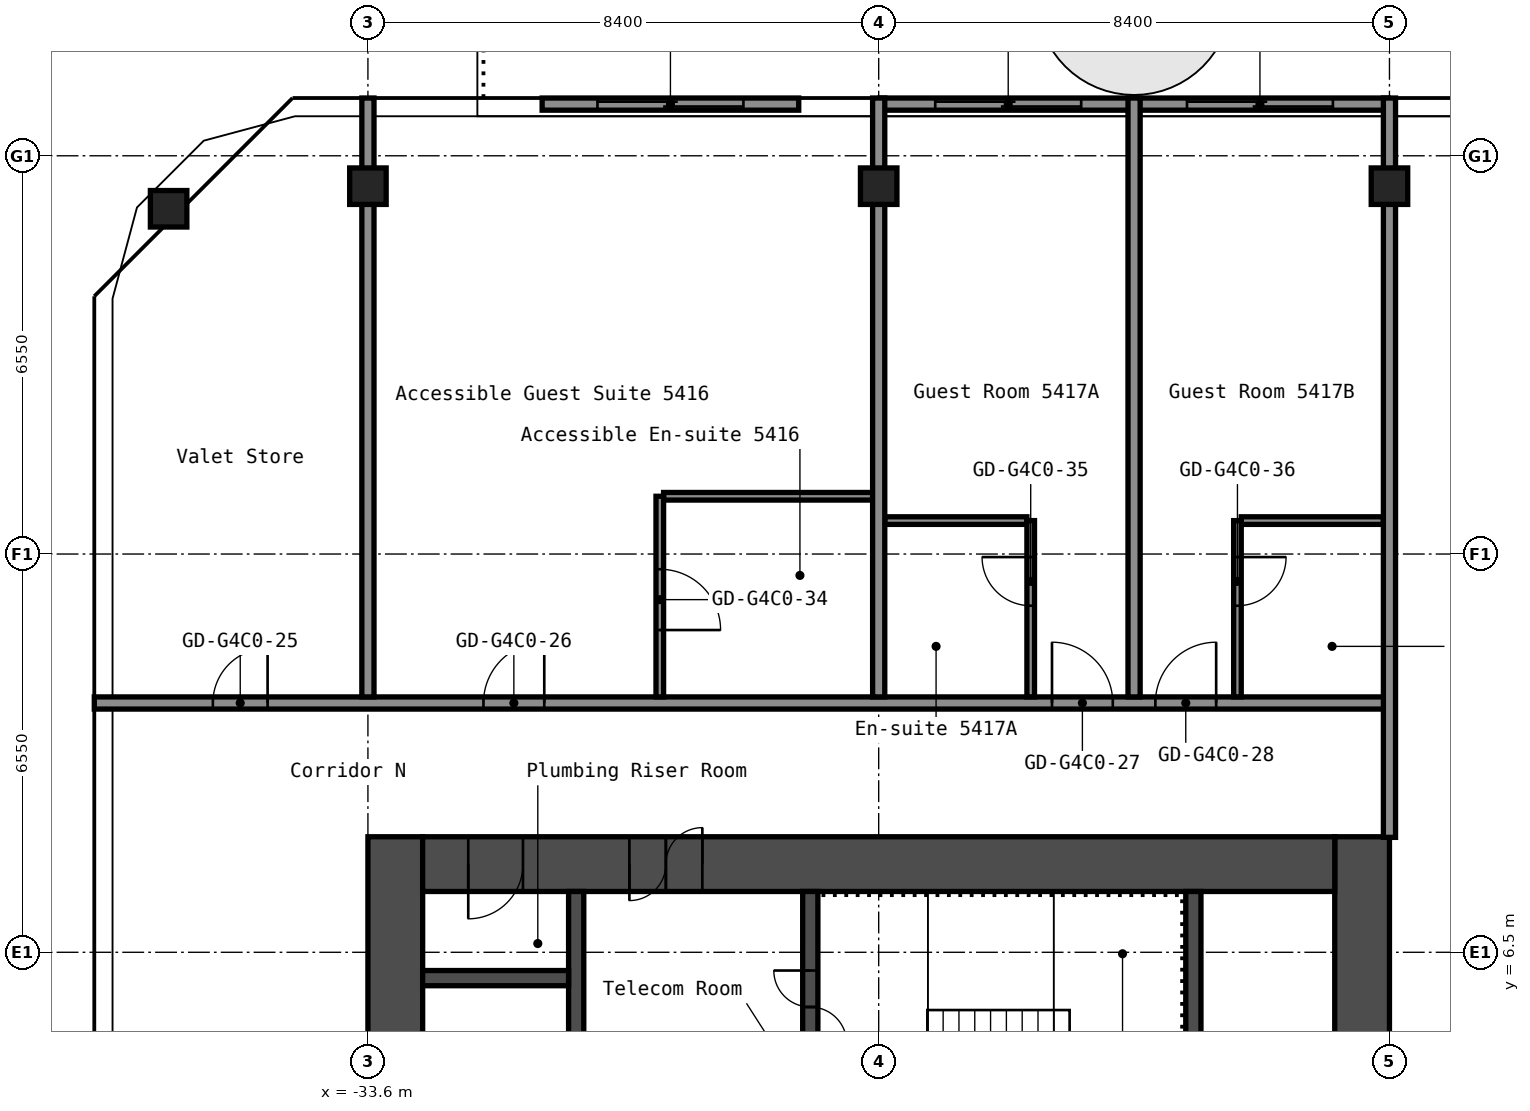
"""IFC4 building model, lengths in metres.
Left out: names, types, materials, properties, quantities, classifications, styles, units other than length and angle.
Written with IfcOpenShell. Run it as: python <this file> out.ifc"""

import sys

from ifc_helpers import new_model, si_unit, direction, frame, frame_2d, origin, origin_2d, place, context, subcontext, project, spatial, rectangle, hollow_rectangle, extrude, element, fill, save


model = new_model("IFC4")
c1 = context("Model", 3, precision=1e-05, world=origin(), true_north=direction((0.0, 1.0)))
c2 = subcontext(c1, "Body", "Model", "MODEL_VIEW")
j1 = project(units=[si_unit("LENGTHUNIT", "METRE"), si_unit("PLANEANGLEUNIT", "RADIAN")], contexts=[c1])
p1 = place(None, origin())
s1 = spatial("IfcSite", under=j1, at=p1, CompositionType="ELEMENT")
p2 = place(p1, origin())
s2 = spatial("IfcBuilding", under=s1, at=p2, CompositionType="ELEMENT")
p3 = place(p2, frame((0.0, 0.0, 193.0)))
s3 = spatial("IfcBuildingStorey", under=s2, at=p3, CompositionType="ELEMENT", Elevation=193.0)
for number, where, z_axis, x_axis in (
    (1, (-36.878, 18.729, 0.0), (0.0, 0.0, 1.0), (1.0, 0.0, 0.0)),
    (2, (-33.6, 19.1, 0.0), (0.0, 0.0, 1.0), (1.0, 0.0, 0.0)),
    (3, (-25.2, 19.1, 0.0), (0.0, 0.0, 1.0), (1.0, 0.0, 0.0)),
    (4, (-16.8, 19.1, 0.0), (0.0, 0.0, 1.0), (1.0, 0.0, 0.0)),
):
    element("IfcColumn", number, at=place(p3, frame(where, z_axis=z_axis, x_axis=x_axis)), inside=s3, PredefinedType="COLUMN", context=c2, shape_type="SweptSolid", body=[
        extrude(hollow_rectangle(XDim=0.6, YDim=0.6, WallThickness=0.025, InnerFilletRadius=0.038, OuterFilletRadius=0.062, at=origin_2d()), origin(), (0.0, 0.0, 1.0), 2.75),
    ])
p4 = place(p3, frame((-17.25, -8.4, 0.0), z_axis=(0.0, 0.0, 1.0), x_axis=(0.0, 1.0, 0.0)))
e5 = element("IfcWall", 5, at=p4, inside=s3, PredefinedType="SHEAR", context=c2, shape_type="SweptSolid", body=[
    extrude(rectangle(XDim=16.8, YDim=0.9, at=frame_2d((8.4, 0.0))), origin(), (0.0, 0.0, 1.0), 2.75),
])
p5 = place(p4, frame((10.1, 0.0, 0.0)))
e6 = element("IfcOpeningElement", 6, at=p5, cuts=e5, PredefinedType="OPENING", context=c2, shape_type="SweptSolid", body=[
    extrude(rectangle(XDim=1.6, YDim=2.1, at=frame_2d((0.8, 1.05))), frame((0.0, 0.46, 0.0), z_axis=(0.0, -1.0, 0.0), x_axis=(1.0, 0.0, 0.0)), (0.0, 0.0, 1.0), 0.92),
])
p6 = place(p3, frame((-33.15, -8.4, 0.0), z_axis=(0.0, 0.0, 1.0), x_axis=(0.0, 1.0, 0.0)))
e7 = element("IfcWall", 7, at=p6, inside=s3, PredefinedType="SHEAR", context=c2, shape_type="SweptSolid", body=[
    extrude(rectangle(XDim=16.8, YDim=0.9, at=frame_2d((8.4, 0.0))), origin(), (0.0, 0.0, 1.0), 2.75),
])
p7 = place(p3, frame((-32.7, 7.95, 0.0), z_axis=(0.0, 0.0, 1.0), x_axis=(1.0, 0.0, 0.0)))
e8 = element("IfcWall", 8, at=p7, inside=s3, PredefinedType="SHEAR", context=c2, shape_type="SweptSolid", body=[
    extrude(rectangle(XDim=15.0, YDim=0.9, at=frame_2d((7.5, 0.0))), origin(), (0.0, 0.0, 1.0), 2.75),
])
p8 = place(p7, frame((3.4, 0.0, 0.0)))
e9 = element("IfcOpeningElement", 9, at=p8, cuts=e8, PredefinedType="OPENING", context=c2, shape_type="SweptSolid", body=[
    extrude(rectangle(XDim=1.2, YDim=2.1, at=frame_2d((0.6, 1.05))), frame((0.0, 0.46, 0.0), z_axis=(0.0, -1.0, 0.0), x_axis=(1.0, 0.0, 0.0)), (0.0, 0.0, 1.0), 0.92),
])
p9 = place(p7, frame((0.75, 0.0, 0.0)))
e10 = element("IfcOpeningElement", 10, at=p9, cuts=e8, PredefinedType="OPENING", context=c2, shape_type="SweptSolid", body=[
    extrude(rectangle(XDim=0.9, YDim=2.1, at=frame_2d((0.45, 1.05))), frame((0.0, 0.46, 0.0), z_axis=(0.0, -1.0, 0.0), x_axis=(1.0, 0.0, 0.0)), (0.0, 0.0, 1.0), 0.92),
])
p10 = place(p3, frame((-20.025, 1.2, 0.0), z_axis=(0.0, 0.0, 1.0), x_axis=(0.0, 1.0, 0.0)))
e11 = element("IfcWall", 11, at=p10, inside=s3, PredefinedType="SHEAR", context=c2, shape_type="SweptSolid", body=[
    extrude(rectangle(XDim=6.3, YDim=0.25, at=frame_2d((3.15, 0.0))), origin(), (0.0, 0.0, 1.0), 2.75),
])
p11 = place(p3, frame((-26.325, 3.75, 0.0), z_axis=(0.0, 0.0, 1.0), x_axis=(0.0, 1.0, 0.0)))
e12 = element("IfcWall", 12, at=p11, inside=s3, PredefinedType="SHEAR", context=c2, shape_type="SweptSolid", body=[
    extrude(rectangle(XDim=3.75, YDim=0.25, at=frame_2d((1.875, 0.0))), origin(), (0.0, 0.0, 1.0), 2.75),
])
p12 = place(p11, frame((1.25, 0.0, 0.0)))
e13 = element("IfcOpeningElement", 13, at=p12, cuts=e12, PredefinedType="OPENING", context=c2, shape_type="SweptSolid", body=[
    extrude(rectangle(XDim=1.2, YDim=2.1, at=frame_2d((0.6, 1.05))), frame((0.0, 0.135, 0.0), z_axis=(0.0, -1.0, 0.0), x_axis=(1.0, 0.0, 0.0)), (0.0, 0.0, 1.0), 0.27),
])
p13 = place(p3, frame((-30.175, 1.45, 0.0), z_axis=(0.0, 0.0, 1.0), x_axis=(0.0, 1.0, 0.0)))
e14 = element("IfcWall", 14, at=p13, inside=s3, PredefinedType="SHEAR", context=c2, shape_type="SweptSolid", body=[
    extrude(rectangle(XDim=6.05, YDim=0.25, at=frame_2d((3.025, 0.0))), origin(), (0.0, 0.0, 1.0), 2.75),
])
p14 = place(p13, frame((2.625, 0.0, 0.0)))
e15 = element("IfcOpeningElement", 15, at=p14, cuts=e14, PredefinedType="OPENING", context=c2, shape_type="SweptSolid", body=[
    extrude(rectangle(XDim=1.1, YDim=2.1, at=frame_2d((0.55, 1.05))), frame((0.0, 0.135, 0.0), z_axis=(0.0, -1.0, 0.0), x_axis=(1.0, 0.0, 0.0)), (0.0, 0.0, 1.0), 0.27),
])
p15 = place(p3, frame((-32.7, 6.075, 0.0), z_axis=(0.0, 0.0, 1.0), x_axis=(1.0, 0.0, 0.0)))
e16 = element("IfcWall", 16, at=p15, inside=s3, PredefinedType="SHEAR", context=c2, shape_type="SweptSolid", body=[
    extrude(rectangle(XDim=2.4, YDim=0.25, at=frame_2d((1.2, 0.0))), origin(), (0.0, 0.0, 1.0), 2.75),
])
p16 = place(p3, frame((-38.1, 10.6, 0.0), z_axis=(0.0, 0.0, 1.0), x_axis=(1.0, 0.0, 0.0)))
e17 = element("IfcWall", 17, at=p16, inside=s3, PredefinedType="PARTITIONING", context=c2, shape_type="SweptSolid", body=[
    extrude(rectangle(XDim=21.3, YDim=0.2, at=frame_2d((10.65, 0.0))), origin(), (0.0, 0.0, 1.0), 2.75),
])
p17 = place(p16, frame((1.95, 0.0, 0.0)))
e18 = element("IfcOpeningElement", 18, at=p17, cuts=e17, PredefinedType="OPENING", context=c2, shape_type="SweptSolid", body=[
    extrude(rectangle(XDim=0.9, YDim=2.1, at=frame_2d((0.45, 1.05))), frame((0.0, 0.11, 0.0), z_axis=(0.0, -1.0, 0.0), x_axis=(1.0, 0.0, 0.0)), (0.0, 0.0, 1.0), 0.22),
])
p18 = place(p16, frame((6.4, 0.0, 0.0)))
e19 = element("IfcOpeningElement", 19, at=p18, cuts=e17, PredefinedType="OPENING", context=c2, shape_type="SweptSolid", body=[
    extrude(rectangle(XDim=1.0, YDim=2.1, at=frame_2d((0.5, 1.05))), frame((0.0, 0.11, 0.0), z_axis=(0.0, -1.0, 0.0), x_axis=(1.0, 0.0, 0.0)), (0.0, 0.0, 1.0), 0.22),
])
p19 = place(p16, frame((15.75, 0.0, 0.0)))
e20 = element("IfcOpeningElement", 20, at=p19, cuts=e17, PredefinedType="OPENING", context=c2, shape_type="SweptSolid", body=[
    extrude(rectangle(XDim=1.0, YDim=2.1, at=frame_2d((0.5, 1.05))), frame((0.0, 0.11, 0.0), z_axis=(0.0, -1.0, 0.0), x_axis=(1.0, 0.0, 0.0)), (0.0, 0.0, 1.0), 0.22),
])
p20 = place(p16, frame((17.45, 0.0, 0.0)))
e21 = element("IfcOpeningElement", 21, at=p20, cuts=e17, PredefinedType="OPENING", context=c2, shape_type="SweptSolid", body=[
    extrude(rectangle(XDim=1.0, YDim=2.1, at=frame_2d((0.5, 1.05))), frame((0.0, 0.11, 0.0), z_axis=(0.0, -1.0, 0.0), x_axis=(1.0, 0.0, 0.0)), (0.0, 0.0, 1.0), 0.22),
])
for number, where, z_axis, x_axis in (
    (22, (-25.1, 13.6, 0.0), (0.0, 0.0, 1.0), (1.0, 0.0, 0.0)),
    (23, (-19.238, 13.6, 0.0), (0.0, 0.0, 1.0), (1.0, 0.0, 0.0)),
):
    element("IfcWall", number, at=place(p3, frame(where, z_axis=z_axis, x_axis=x_axis)), inside=s3, PredefinedType="PARTITIONING", context=c2, shape_type="SweptSolid", body=[
        extrude(rectangle(XDim=2.338, YDim=0.125, at=frame_2d((1.169, 0.0))), origin(), (0.0, 0.0, 1.0), 2.75),
    ])
p21 = place(p3, frame((-28.738, 14.0, 0.0), z_axis=(0.0, 0.0, 1.0), x_axis=(1.0, 0.0, 0.0)))
e24 = element("IfcWall", 24, at=p21, inside=s3, PredefinedType="PARTITIONING", context=c2, shape_type="SweptSolid", body=[
    extrude(rectangle(XDim=3.438, YDim=0.125, at=frame_2d((1.719, 0.0))), origin(), (0.0, 0.0, 1.0), 2.75),
])
p22 = place(p3, frame((-33.6, 10.7, 0.0), z_axis=(0.0, 0.0, 1.0), x_axis=(0.0, 1.0, 0.0)))
e25 = element("IfcWall", 25, at=p22, inside=s3, PredefinedType="PARTITIONING", context=c2, shape_type="SweptSolid", body=[
    extrude(rectangle(XDim=9.85, YDim=0.2, at=frame_2d((4.925, 0.0))), origin(), (0.0, 0.0, 1.0), 2.75),
])
p23 = place(p3, frame((-28.8, 10.7, 0.0), z_axis=(0.0, 0.0, 1.0), x_axis=(0.0, 1.0, 0.0)))
e26 = element("IfcWall", 26, at=p23, inside=s3, PredefinedType="PARTITIONING", context=c2, shape_type="SweptSolid", body=[
    extrude(rectangle(XDim=3.3, YDim=0.125, at=frame_2d((1.65, 0.0))), origin(), (0.0, 0.0, 1.0), 2.75),
])
p24 = place(p23, frame((1.1, 0.0, 0.0)))
e27 = element("IfcOpeningElement", 27, at=p24, cuts=e26, PredefinedType="OPENING", context=c2, shape_type="SweptSolid", body=[
    extrude(rectangle(XDim=1.0, YDim=2.1, at=frame_2d((0.5, 1.05))), frame((0.0, 0.073, 0.0), z_axis=(0.0, -1.0, 0.0), x_axis=(1.0, 0.0, 0.0)), (0.0, 0.0, 1.0), 0.145),
])
p25 = place(p3, frame((-25.2, 10.7, 0.0), z_axis=(0.0, 0.0, 1.0), x_axis=(0.0, 1.0, 0.0)))
e28 = element("IfcWall", 28, at=p25, inside=s3, PredefinedType="PARTITIONING", context=c2, shape_type="SweptSolid", body=[
    extrude(rectangle(XDim=9.85, YDim=0.2, at=frame_2d((4.925, 0.0))), origin(), (0.0, 0.0, 1.0), 2.75),
])
p26 = place(p3, frame((-22.7, 10.7, 0.0), z_axis=(0.0, 0.0, 1.0), x_axis=(0.0, 1.0, 0.0)))
e29 = element("IfcWall", 29, at=p26, inside=s3, PredefinedType="PARTITIONING", context=c2, shape_type="SweptSolid", body=[
    extrude(rectangle(XDim=2.9, YDim=0.125, at=frame_2d((1.45, 0.0))), origin(), (0.0, 0.0, 1.0), 2.75),
])
p27 = place(p26, frame((1.5, 0.0, 0.0)))
e30 = element("IfcOpeningElement", 30, at=p27, cuts=e29, PredefinedType="OPENING", context=c2, shape_type="SweptSolid", body=[
    extrude(rectangle(XDim=0.8, YDim=2.1, at=frame_2d((0.4, 1.05))), frame((0.0, 0.073, 0.0), z_axis=(0.0, -1.0, 0.0), x_axis=(1.0, 0.0, 0.0)), (0.0, 0.0, 1.0), 0.145),
])
p28 = place(p3, frame((-21.0, 10.7, 0.0), z_axis=(0.0, 0.0, 1.0), x_axis=(0.0, 1.0, 0.0)))
e31 = element("IfcWall", 31, at=p28, inside=s3, PredefinedType="PARTITIONING", context=c2, shape_type="SweptSolid", body=[
    extrude(rectangle(XDim=9.85, YDim=0.2, at=frame_2d((4.925, 0.0))), origin(), (0.0, 0.0, 1.0), 2.75),
])
p29 = place(p3, frame((-19.3, 10.7, 0.0), z_axis=(0.0, 0.0, 1.0), x_axis=(0.0, 1.0, 0.0)))
e32 = element("IfcWall", 32, at=p29, inside=s3, PredefinedType="PARTITIONING", context=c2, shape_type="SweptSolid", body=[
    extrude(rectangle(XDim=2.9, YDim=0.125, at=frame_2d((1.45, 0.0))), origin(), (0.0, 0.0, 1.0), 2.75),
])
p30 = place(p29, frame((1.5, 0.0, 0.0)))
e33 = element("IfcOpeningElement", 33, at=p30, cuts=e32, PredefinedType="OPENING", context=c2, shape_type="SweptSolid", body=[
    extrude(rectangle(XDim=0.8, YDim=2.1, at=frame_2d((0.4, 1.05))), frame((0.0, 0.073, 0.0), z_axis=(0.0, -1.0, 0.0), x_axis=(1.0, 0.0, 0.0)), (0.0, 0.0, 1.0), 0.145),
])
p31 = place(p3, frame((-16.8, 8.39, 0.0), z_axis=(0.0, 0.0, 1.0), x_axis=(0.0, 1.0, 0.0)))
e34 = element("IfcWall", 34, at=p31, inside=s3, PredefinedType="PARTITIONING", context=c2, shape_type="SweptSolid", body=[
    extrude(rectangle(XDim=12.16, YDim=0.2, at=frame_2d((6.08, 0.0))), origin(), (0.0, 0.0, 1.0), 2.75),
])
p32 = place(p3, frame((-16.82, 20.45, 0.0), z_axis=(0.0, 0.0, 1.0), x_axis=(-1.0, 0.0, 0.0)))
p33 = place(p32, frame((0.91, 0.0, 0.0)))
p34 = place(p33, frame((2.4, 0.0, 0.0), z_axis=(0.0, 0.0, 1.0), x_axis=(-1.0, 0.0, 0.0)))
e35 = element("IfcDoor", 35, at=p34, inside=s3, OperationType="SLIDING_TO_LEFT", PredefinedType="DOOR", context=c2, shape_type="SweptSolid", body=[
    extrude(rectangle(XDim=2.4, YDim=2.2, at=frame_2d((1.2, 1.1))), frame((0.0, 0.025, 0.0), z_axis=(0.0, -1.0, 0.0), x_axis=(1.0, 0.0, 0.0)), (0.0, 0.0, 1.0), 0.05),
])
p35 = place(p3, frame((-20.96, 20.45, 0.0), z_axis=(0.0, 0.0, 1.0), x_axis=(-1.0, 0.0, 0.0)))
p36 = place(p35, frame((0.91, 0.0, 0.0)))
p37 = place(p36, frame((2.4, 0.0, 0.0), z_axis=(0.0, 0.0, 1.0), x_axis=(-1.0, 0.0, 0.0)))
e36 = element("IfcDoor", 36, at=p37, inside=s3, OperationType="SLIDING_TO_LEFT", PredefinedType="DOOR", context=c2, shape_type="SweptSolid", body=[
    extrude(rectangle(XDim=2.4, YDim=2.2, at=frame_2d((1.2, 1.1))), frame((0.0, 0.025, 0.0), z_axis=(0.0, -1.0, 0.0), x_axis=(1.0, 0.0, 0.0)), (0.0, 0.0, 1.0), 0.05),
])
p38 = place(p3, frame((-26.515, 20.45, 0.0), z_axis=(0.0, 0.0, 1.0), x_axis=(-1.0, 0.0, 0.0)))
p39 = place(p38, frame((0.91, 0.0, 0.0)))
p40 = place(p39, frame((2.4, 0.0, 0.0), z_axis=(0.0, 0.0, 1.0), x_axis=(-1.0, 0.0, 0.0)))
e37 = element("IfcDoor", 37, at=p40, inside=s3, OperationType="SLIDING_TO_LEFT", PredefinedType="DOOR", context=c2, shape_type="SweptSolid", body=[
    extrude(rectangle(XDim=2.4, YDim=2.2, at=frame_2d((1.2, 1.1))), frame((0.0, 0.025, 0.0), z_axis=(0.0, -1.0, 0.0), x_axis=(1.0, 0.0, 0.0)), (0.0, 0.0, 1.0), 0.05),
])
p41 = place(p8, origin())
e38 = element("IfcDoor", 38, at=p41, inside=s3, OperationType="DOUBLE_DOOR_SINGLE_SWING", PredefinedType="DOOR", context=c2, shape_type="SweptSolid", body=[
    extrude(rectangle(XDim=1.2, YDim=2.1, at=frame_2d((0.6, 1.05))), frame((0.0, 0.025, 0.0), z_axis=(0.0, -1.0, 0.0), x_axis=(1.0, 0.0, 0.0)), (0.0, 0.0, 1.0), 0.05),
])
fill(e9, e38)
p42 = place(p9, origin())
e39 = element("IfcDoor", 39, at=p42, inside=s3, OperationType="SINGLE_SWING_LEFT", PredefinedType="DOOR", context=c2, shape_type="SweptSolid", body=[
    extrude(rectangle(XDim=0.9, YDim=2.1, at=frame_2d((0.45, 1.05))), frame((0.0, 0.025, 0.0), z_axis=(0.0, -1.0, 0.0), x_axis=(1.0, 0.0, 0.0)), (0.0, 0.0, 1.0), 0.05),
])
fill(e10, e39)
p43 = place(p12, origin())
e40 = element("IfcDoor", 40, at=p43, inside=s3, OperationType="DOUBLE_DOOR_SINGLE_SWING", PredefinedType="DOOR", context=c2, shape_type="SweptSolid", body=[
    extrude(rectangle(XDim=1.2, YDim=2.1, at=frame_2d((0.6, 1.05))), frame((0.0, 0.025, 0.0), z_axis=(0.0, -1.0, 0.0), x_axis=(1.0, 0.0, 0.0)), (0.0, 0.0, 1.0), 0.05),
])
fill(e13, e40)
p44 = place(p17, origin())
e41 = element("IfcDoor", 41, at=p44, inside=s3, OperationType="SINGLE_SWING_LEFT", PredefinedType="DOOR", context=c2, shape_type="SweptSolid", body=[
    extrude(rectangle(XDim=0.9, YDim=2.1, at=frame_2d((0.45, 1.05))), frame((0.0, 0.025, 0.0), z_axis=(0.0, -1.0, 0.0), x_axis=(1.0, 0.0, 0.0)), (0.0, 0.0, 1.0), 0.05),
])
fill(e18, e41)
p45 = place(p18, origin())
e42 = element("IfcDoor", 42, at=p45, inside=s3, OperationType="SINGLE_SWING_LEFT", PredefinedType="DOOR", context=c2, shape_type="SweptSolid", body=[
    extrude(rectangle(XDim=1.0, YDim=2.1, at=frame_2d((0.5, 1.05))), frame((0.0, 0.025, 0.0), z_axis=(0.0, -1.0, 0.0), x_axis=(1.0, 0.0, 0.0)), (0.0, 0.0, 1.0), 0.05),
])
fill(e19, e42)
p46 = place(p19, origin())
e43 = element("IfcDoor", 43, at=p46, inside=s3, OperationType="SINGLE_SWING_RIGHT", PredefinedType="DOOR", context=c2, shape_type="SweptSolid", body=[
    extrude(rectangle(XDim=1.0, YDim=2.1, at=frame_2d((0.5, 1.05))), frame((0.0, 0.025, 0.0), z_axis=(0.0, -1.0, 0.0), x_axis=(1.0, 0.0, 0.0)), (0.0, 0.0, 1.0), 0.05),
])
fill(e20, e43)
p47 = place(p20, origin())
e44 = element("IfcDoor", 44, at=p47, inside=s3, OperationType="SINGLE_SWING_LEFT", PredefinedType="DOOR", context=c2, shape_type="SweptSolid", body=[
    extrude(rectangle(XDim=1.0, YDim=2.1, at=frame_2d((0.5, 1.05))), frame((0.0, 0.025, 0.0), z_axis=(0.0, -1.0, 0.0), x_axis=(1.0, 0.0, 0.0)), (0.0, 0.0, 1.0), 0.05),
])
fill(e21, e44)
p48 = place(p24, origin())
e45 = element("IfcDoor", 45, at=p48, inside=s3, OperationType="SINGLE_SWING_LEFT", PredefinedType="DOOR", context=c2, shape_type="SweptSolid", body=[
    extrude(rectangle(XDim=1.0, YDim=2.1, at=frame_2d((0.5, 1.05))), frame((0.0, 0.025, 0.0), z_axis=(0.0, -1.0, 0.0), x_axis=(1.0, 0.0, 0.0)), (0.0, 0.0, 1.0), 0.05),
])
fill(e27, e45)
p49 = place(p27, origin())
e46 = element("IfcDoor", 46, at=p49, inside=s3, OperationType="SINGLE_SWING_LEFT", PredefinedType="DOOR", context=c2, shape_type="SweptSolid", body=[
    extrude(rectangle(XDim=0.8, YDim=2.1, at=frame_2d((0.4, 1.05))), frame((0.0, 0.025, 0.0), z_axis=(0.0, -1.0, 0.0), x_axis=(1.0, 0.0, 0.0)), (0.0, 0.0, 1.0), 0.05),
])
fill(e30, e46)
p50 = place(p30, origin())
e47 = element("IfcDoor", 47, at=p50, inside=s3, OperationType="SINGLE_SWING_RIGHT", PredefinedType="DOOR", context=c2, shape_type="SweptSolid", body=[
    extrude(rectangle(XDim=0.8, YDim=2.1, at=frame_2d((0.4, 1.05))), frame((0.0, 0.025, 0.0), z_axis=(0.0, -1.0, 0.0), x_axis=(1.0, 0.0, 0.0)), (0.0, 0.0, 1.0), 0.05),
])
fill(e33, e47)
save(model, sys.argv[1])
